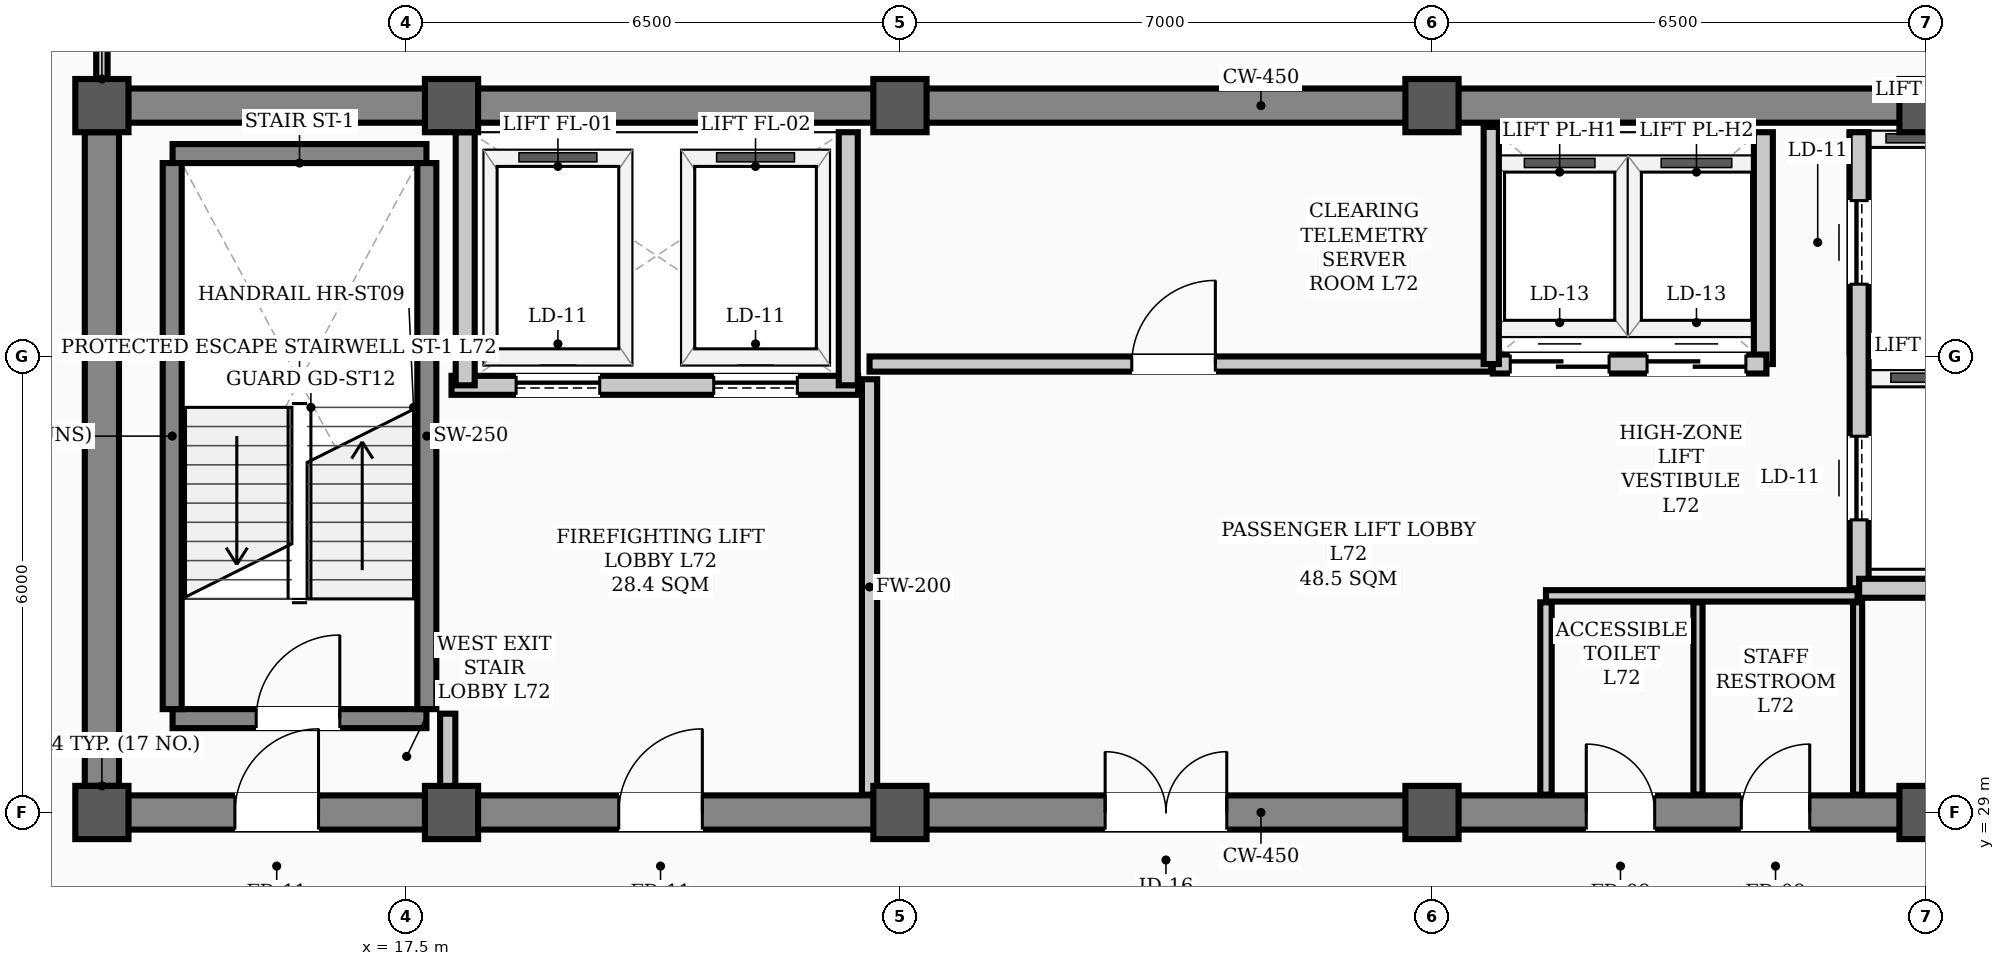
"""IFC4 building model, lengths in metres.
Left out: names, types, materials, properties, quantities, classifications, styles, units other than length and angle.
Written with IfcOpenShell. Run it as: python <this file> out.ifc"""

import sys

from ifc_helpers import new_model, si_unit, direction, frame, frame_2d, origin, origin_2d, place, context, subcontext, project, spatial, rectangle, hollow_rectangle, extrude, element, fill, save


model = new_model("IFC4")
c1 = context("Model", 3, precision=1e-05, world=origin(), true_north=direction((0.0, 1.0)))
c2 = subcontext(c1, "Body", "Model", "MODEL_VIEW")
j1 = project(units=[si_unit("LENGTHUNIT", "METRE"), si_unit("PLANEANGLEUNIT", "RADIAN")], contexts=[c1])
p1 = place(None, origin())
s1 = spatial("IfcSite", under=j1, at=p1, CompositionType="ELEMENT")
p2 = place(p1, origin())
s2 = spatial("IfcBuilding", under=s1, at=p2, CompositionType="ELEMENT")
p3 = place(p2, frame((0.0, 0.0, 289.1)))
s3 = spatial("IfcBuildingStorey", under=s2, at=p3, CompositionType="ELEMENT", Elevation=289.1)
for number, where, z_axis, x_axis in (
    (1, (13.5, 29.0, 0.0), (0.0, 0.0, 1.0), (1.0, 0.0, 0.0)),
    (2, (13.5, 38.3, 0.0), (0.0, 0.0, 1.0), (1.0, 0.0, 0.0)),
    (3, (18.1, 29.0, 0.0), (0.0, 0.0, 1.0), (1.0, 0.0, 0.0)),
    (4, (18.1, 38.3, 0.0), (0.0, 0.0, 1.0), (1.0, 0.0, 0.0)),
    (5, (24.0, 29.0, 0.0), (0.0, 0.0, 1.0), (1.0, 0.0, 0.0)),
    (6, (24.0, 38.3, 0.0), (0.0, 0.0, 1.0), (1.0, 0.0, 0.0)),
    (7, (31.0, 29.0, 0.0), (0.0, 0.0, 1.0), (1.0, 0.0, 0.0)),
    (8, (31.0, 38.3, 0.0), (0.0, 0.0, 1.0), (1.0, 0.0, 0.0)),
    (9, (37.5, 29.0, 0.0), (0.0, 0.0, 1.0), (1.0, 0.0, 0.0)),
    (10, (37.5, 38.3, 0.0), (0.0, 0.0, 1.0), (1.0, 0.0, 0.0)),
):
    element("IfcColumn", number, at=place(p3, frame(where, z_axis=z_axis, x_axis=x_axis)), inside=s3, PredefinedType="COLUMN", context=c2, shape_type="SweptSolid", body=[
        extrude(hollow_rectangle(XDim=0.7, YDim=0.7, WallThickness=0.028, InnerFilletRadius=0.014, OuterFilletRadius=0.042, at=origin_2d()), origin(), (0.0, 0.0, 1.0), 3.9),
    ])
p4 = place(p3, frame((13.5, 29.0, 0.0), z_axis=(0.0, 0.0, 1.0), x_axis=(1.0, 0.0, 0.0)))
e11 = element("IfcWall", 11, at=p4, inside=s3, PredefinedType="SHEAR", context=c2, shape_type="SweptSolid", body=[
    extrude(rectangle(XDim=30.5, YDim=0.45, at=frame_2d((15.25, 0.0))), origin(), (0.0, 0.0, 1.0), 3.72),
])
p5 = place(p4, frame((1.75, 0.0, 0.0)))
e12 = element("IfcOpeningElement", 12, at=p5, cuts=e11, PredefinedType="OPENING", context=c2, shape_type="SweptSolid", body=[
    extrude(rectangle(XDim=1.1, YDim=2.08, at=frame_2d((0.55, 1.04))), frame((0.0, 0.235, 0.0), z_axis=(0.0, -1.0, 0.0), x_axis=(1.0, 0.0, 0.0)), (0.0, 0.0, 1.0), 0.47),
])
p6 = place(p4, frame((26.7, 0.0, 0.0)))
e13 = element("IfcOpeningElement", 13, at=p6, cuts=e11, PredefinedType="OPENING", context=c2, shape_type="SweptSolid", body=[
    extrude(rectangle(XDim=1.1, YDim=2.08, at=frame_2d((0.55, 1.04))), frame((0.0, 0.235, 0.0), z_axis=(0.0, -1.0, 0.0), x_axis=(1.0, 0.0, 0.0)), (0.0, 0.0, 1.0), 0.47),
])
p7 = place(p4, frame((6.8, 0.0, 0.0)))
e14 = element("IfcOpeningElement", 14, at=p7, cuts=e11, PredefinedType="OPENING", context=c2, shape_type="SweptSolid", body=[
    extrude(rectangle(XDim=1.1, YDim=2.08, at=frame_2d((0.55, 1.04))), frame((0.0, 0.235, 0.0), z_axis=(0.0, -1.0, 0.0), x_axis=(1.0, 0.0, 0.0)), (0.0, 0.0, 1.0), 0.47),
])
p8 = place(p4, frame((13.2, 0.0, 0.0)))
e15 = element("IfcOpeningElement", 15, at=p8, cuts=e11, PredefinedType="OPENING", context=c2, shape_type="SweptSolid", body=[
    extrude(rectangle(XDim=1.6, YDim=2.08, at=frame_2d((0.8, 1.04))), frame((0.0, 0.235, 0.0), z_axis=(0.0, -1.0, 0.0), x_axis=(1.0, 0.0, 0.0)), (0.0, 0.0, 1.0), 0.47),
])
p9 = place(p4, frame((19.53, 0.0, 0.0)))
e16 = element("IfcOpeningElement", 16, at=p9, cuts=e11, PredefinedType="OPENING", context=c2, shape_type="SweptSolid", body=[
    extrude(rectangle(XDim=0.9, YDim=2.08, at=frame_2d((0.45, 1.04))), frame((0.0, 0.235, 0.0), z_axis=(0.0, -1.0, 0.0), x_axis=(1.0, 0.0, 0.0)), (0.0, 0.0, 1.0), 0.47),
])
p10 = place(p4, frame((21.57, 0.0, 0.0)))
e17 = element("IfcOpeningElement", 17, at=p10, cuts=e11, PredefinedType="OPENING", context=c2, shape_type="SweptSolid", body=[
    extrude(rectangle(XDim=0.9, YDim=2.08, at=frame_2d((0.45, 1.04))), frame((0.0, 0.235, 0.0), z_axis=(0.0, -1.0, 0.0), x_axis=(1.0, 0.0, 0.0)), (0.0, 0.0, 1.0), 0.47),
])
p11 = place(p3, frame((13.5, 38.3, 0.0), z_axis=(0.0, 0.0, 1.0), x_axis=(1.0, 0.0, 0.0)))
e18 = element("IfcWall", 18, at=p11, inside=s3, PredefinedType="SHEAR", context=c2, shape_type="SweptSolid", body=[
    extrude(rectangle(XDim=30.5, YDim=0.45, at=frame_2d((15.25, 0.0))), origin(), (0.0, 0.0, 1.0), 3.72),
])
p12 = place(p3, frame((13.5, 29.35, 0.0), z_axis=(0.0, 0.0, 1.0), x_axis=(0.0, 1.0, 0.0)))
e19 = element("IfcWall", 19, at=p12, inside=s3, PredefinedType="SHEAR", context=c2, shape_type="SweptSolid", body=[
    extrude(rectangle(XDim=8.6, YDim=0.45, at=frame_2d((4.3, 0.0))), origin(), (0.0, 0.0, 1.0), 3.72),
])
p13 = place(p3, frame((14.43, 30.235, 0.0), z_axis=(0.0, 0.0, 1.0), x_axis=(1.0, 0.0, 0.0)))
e20 = element("IfcWall", 20, at=p13, inside=s3, PredefinedType="STANDARD", context=c2, shape_type="SweptSolid", body=[
    extrude(rectangle(XDim=3.34, YDim=0.25, at=frame_2d((1.67, 0.0))), origin(), (0.0, 0.0, 1.0), 3.72),
])
p14 = place(p13, frame((1.1, 0.0, 0.0)))
e21 = element("IfcOpeningElement", 21, at=p14, cuts=e20, PredefinedType="OPENING", context=c2, shape_type="SweptSolid", body=[
    extrude(rectangle(XDim=1.1, YDim=2.08, at=frame_2d((0.55, 1.04))), frame((0.0, 0.135, 0.0), z_axis=(0.0, -1.0, 0.0), x_axis=(1.0, 0.0, 0.0)), (0.0, 0.0, 1.0), 0.27),
])
p15 = place(p3, frame((14.43, 37.669, 0.0), z_axis=(0.0, 0.0, 1.0), x_axis=(1.0, 0.0, 0.0)))
e22 = element("IfcWall", 22, at=p15, inside=s3, PredefinedType="STANDARD", context=c2, shape_type="SweptSolid", body=[
    extrude(rectangle(XDim=3.34, YDim=0.25, at=frame_2d((1.67, 0.0))), origin(), (0.0, 0.0, 1.0), 3.72),
])
for number, where, z_axis, x_axis in (
    (23, (14.425, 30.36, 0.0), (0.0, 0.0, 1.0), (0.0, 1.0, 0.0)),
    (24, (17.775, 30.36, 0.0), (0.0, 0.0, 1.0), (0.0, 1.0, 0.0)),
):
    element("IfcWall", number, at=place(p3, frame(where, z_axis=z_axis, x_axis=x_axis)), inside=s3, PredefinedType="STANDARD", context=c2, shape_type="SweptSolid", body=[
        extrude(rectangle(XDim=7.184, YDim=0.25, at=frame_2d((3.592, 0.0))), origin(), (0.0, 0.0, 1.0), 3.72),
    ])
p16 = place(p3, frame((18.1, 34.62, 0.0), z_axis=(0.0, 0.0, 1.0), x_axis=(1.0, 0.0, 0.0)))
e25 = element("IfcWall", 25, at=p16, inside=s3, PredefinedType="STANDARD", context=c2, shape_type="SweptSolid", body=[
    extrude(rectangle(XDim=5.35, YDim=0.25, at=frame_2d((2.675, 0.0))), origin(), (0.0, 0.0, 1.0), 3.72),
])
p17 = place(p16, frame((0.85, 0.0, 0.0)))
e26 = element("IfcOpeningElement", 26, at=p17, cuts=e25, PredefinedType="OPENING", context=c2, shape_type="SweptSolid", body=[
    extrude(rectangle(XDim=1.1, YDim=2.08, at=frame_2d((0.55, 1.04))), frame((0.0, 0.135, 0.0), z_axis=(0.0, -1.0, 0.0), x_axis=(1.0, 0.0, 0.0)), (0.0, 0.0, 1.0), 0.27),
])
p18 = place(p16, frame((3.45, 0.0, 0.0)))
e27 = element("IfcOpeningElement", 27, at=p18, cuts=e25, PredefinedType="OPENING", context=c2, shape_type="SweptSolid", body=[
    extrude(rectangle(XDim=1.1, YDim=2.08, at=frame_2d((0.55, 1.04))), frame((0.0, 0.135, 0.0), z_axis=(0.0, -1.0, 0.0), x_axis=(1.0, 0.0, 0.0)), (0.0, 0.0, 1.0), 0.27),
])
p19 = place(p3, frame((36.62, 31.95, 0.0), z_axis=(0.0, 0.0, 1.0), x_axis=(0.0, 1.0, 0.0)))
e28 = element("IfcWall", 28, at=p19, inside=s3, PredefinedType="STANDARD", context=c2, shape_type="SweptSolid", body=[
    extrude(rectangle(XDim=6.0, YDim=0.25, at=frame_2d((3.0, 0.0))), origin(), (0.0, 0.0, 1.0), 3.4),
])
p20 = place(p19, frame((0.9, 0.0, 0.0)))
e29 = element("IfcOpeningElement", 29, at=p20, cuts=e28, PredefinedType="OPENING", context=c2, shape_type="SweptSolid", body=[
    extrude(rectangle(XDim=1.1, YDim=2.08, at=frame_2d((0.55, 1.04))), frame((0.0, 0.135, 0.0), z_axis=(0.0, -1.0, 0.0), x_axis=(1.0, 0.0, 0.0)), (0.0, 0.0, 1.0), 0.27),
])
p21 = place(p19, frame((4.0, 0.0, 0.0)))
e30 = element("IfcOpeningElement", 30, at=p21, cuts=e28, PredefinedType="OPENING", context=c2, shape_type="SweptSolid", body=[
    extrude(rectangle(XDim=1.1, YDim=2.08, at=frame_2d((0.55, 1.04))), frame((0.0, 0.135, 0.0), z_axis=(0.0, -1.0, 0.0), x_axis=(1.0, 0.0, 0.0)), (0.0, 0.0, 1.0), 0.27),
])
p22 = place(p3, frame((36.62, 31.95, 0.0), z_axis=(0.0, 0.0, 1.0), x_axis=(1.0, 0.0, 0.0)))
e31 = element("IfcWall", 31, at=p22, inside=s3, PredefinedType="STANDARD", context=c2, shape_type="SweptSolid", body=[
    extrude(rectangle(XDim=1.9, YDim=0.25, at=frame_2d((0.95, 0.0))), origin(), (0.0, 0.0, 1.0), 3.48),
])
for number, where, z_axis, x_axis in (
    (32, (18.28, 34.62, 0.0), (0.0, 0.0, 1.0), (0.0, 1.0, 0.0)),
    (33, (23.32, 34.62, 0.0), (0.0, 0.0, 1.0), (0.0, 1.0, 0.0)),
):
    element("IfcWall", number, at=place(p3, frame(where, z_axis=z_axis, x_axis=x_axis)), inside=s3, PredefinedType="STANDARD", context=c2, shape_type="SweptSolid", body=[
        extrude(rectangle(XDim=3.33, YDim=0.25, at=frame_2d((1.665, 0.0))), origin(), (0.0, 0.0, 1.0), 3.72),
    ])
p23 = place(p3, frame((35.36, 34.9, 0.0), z_axis=(0.0, 0.0, 1.0), x_axis=(0.0, 1.0, 0.0)))
e34 = element("IfcWall", 34, at=p23, inside=s3, PredefinedType="STANDARD", context=c2, shape_type="SweptSolid", body=[
    extrude(rectangle(XDim=3.05, YDim=0.25, at=frame_2d((1.525, 0.0))), origin(), (0.0, 0.0, 1.0), 3.4),
])
p24 = place(p3, frame((31.8, 34.9, 0.0), z_axis=(0.0, 0.0, 1.0), x_axis=(1.0, 0.0, 0.0)))
e35 = element("IfcWall", 35, at=p24, inside=s3, PredefinedType="STANDARD", context=c2, shape_type="SweptSolid", body=[
    extrude(rectangle(XDim=3.6, YDim=0.25, at=frame_2d((1.8, 0.0))), origin(), (0.0, 0.0, 1.0), 3.72),
])
p25 = place(p24, frame((0.23, 0.0, 0.0)))
e36 = element("IfcOpeningElement", 36, at=p25, cuts=e35, PredefinedType="OPENING", context=c2, shape_type="SweptSolid", body=[
    extrude(rectangle(XDim=1.3, YDim=2.08, at=frame_2d((0.65, 1.04))), frame((0.0, 0.135, 0.0), z_axis=(0.0, -1.0, 0.0), x_axis=(1.0, 0.0, 0.0)), (0.0, 0.0, 1.0), 0.27),
])
p26 = place(p24, frame((2.03, 0.0, 0.0)))
e37 = element("IfcOpeningElement", 37, at=p26, cuts=e35, PredefinedType="OPENING", context=c2, shape_type="SweptSolid", body=[
    extrude(rectangle(XDim=1.3, YDim=2.08, at=frame_2d((0.65, 1.04))), frame((0.0, 0.135, 0.0), z_axis=(0.0, -1.0, 0.0), x_axis=(1.0, 0.0, 0.0)), (0.0, 0.0, 1.0), 0.27),
])
p27 = place(p3, frame((23.6, 34.9, 0.0), z_axis=(0.0, 0.0, 1.0), x_axis=(1.0, 0.0, 0.0)))
e38 = element("IfcWall", 38, at=p27, inside=s3, PredefinedType="STANDARD", context=c2, shape_type="SweptSolid", body=[
    extrude(rectangle(XDim=8.18, YDim=0.2, at=frame_2d((4.09, 0.0))), origin(), (0.0, 0.0, 1.0), 3.72),
])
p28 = place(p27, frame((3.45, 0.0, 0.0)))
e39 = element("IfcOpeningElement", 39, at=p28, cuts=e38, PredefinedType="OPENING", context=c2, shape_type="SweptSolid", body=[
    extrude(rectangle(XDim=1.1, YDim=2.08, at=frame_2d((0.55, 1.04))), frame((0.0, 0.11, 0.0), z_axis=(0.0, -1.0, 0.0), x_axis=(1.0, 0.0, 0.0)), (0.0, 0.0, 1.0), 0.22),
])
p29 = place(p3, frame((32.5, 31.85, 0.0), z_axis=(0.0, 0.0, 1.0), x_axis=(1.0, 0.0, 0.0)))
e40 = element("IfcWall", 40, at=p29, inside=s3, PredefinedType="PARTITIONING", context=c2, shape_type="SweptSolid", body=[
    extrude(rectangle(XDim=4.1, YDim=0.15, at=frame_2d((2.05, 0.0))), origin(), (0.0, 0.0, 1.0), 3.72),
])
p30 = place(p3, frame((18.05, 29.235, 0.0), z_axis=(0.0, 0.0, 1.0), x_axis=(0.0, 1.0, 0.0)))
e41 = element("IfcWall", 41, at=p30, inside=s3, PredefinedType="STANDARD", context=c2, shape_type="SweptSolid", body=[
    extrude(rectangle(XDim=1.065, YDim=0.2, at=frame_2d((0.532, 0.0))), origin(), (0.0, 0.0, 1.0), 3.72),
])
p31 = place(p3, frame((23.6, 29.235, 0.0), z_axis=(0.0, 0.0, 1.0), x_axis=(0.0, 1.0, 0.0)))
e42 = element("IfcWall", 42, at=p31, inside=s3, PredefinedType="STANDARD", context=c2, shape_type="SweptSolid", body=[
    extrude(rectangle(XDim=5.465, YDim=0.2, at=frame_2d((2.732, 0.0))), origin(), (0.0, 0.0, 1.0), 3.2),
])
p32 = place(p3, frame((32.5, 29.235, 0.0), z_axis=(0.0, 0.0, 1.0), x_axis=(0.0, 1.0, 0.0)))
e43 = element("IfcWall", 43, at=p32, inside=s3, PredefinedType="PARTITIONING", context=c2, shape_type="SweptSolid", body=[
    extrude(rectangle(XDim=2.53, YDim=0.15, at=frame_2d((1.265, 0.0))), origin(), (0.0, 0.0, 1.0), 3.4),
])
for number, where, z_axis, x_axis in (
    (44, (36.6, 29.235, 0.0), (0.0, 0.0, 1.0), (0.0, 1.0, 0.0)),
    (45, (34.5, 29.235, 0.0), (0.0, 0.0, 1.0), (0.0, 1.0, 0.0)),
):
    element("IfcWall", number, at=place(p3, frame(where, z_axis=z_axis, x_axis=x_axis)), inside=s3, PredefinedType="PARTITIONING", context=c2, shape_type="SweptSolid", body=[
        extrude(rectangle(XDim=2.53, YDim=0.12, at=frame_2d((1.265, 0.0))), origin(), (0.0, 0.0, 1.0), 3.4),
    ])
p33 = place(p3, frame((13.5, 38.535, 0.0), z_axis=(0.0, 0.0, 1.0), x_axis=(0.0, 1.0, 0.0)))
e46 = element("IfcWall", 46, at=p33, inside=s3, PredefinedType="PARTITIONING", context=c2, shape_type="SweptSolid", body=[
    extrude(rectangle(XDim=2.405, YDim=0.15, at=frame_2d((1.203, 0.0))), origin(), (0.0, 0.0, 1.0), 3.72),
])
p34 = place(p3, frame((31.78, 34.9, 0.0), z_axis=(0.0, 0.0, 1.0), x_axis=(0.0, 1.0, 0.0)))
e47 = element("IfcWall", 47, at=p34, inside=s3, PredefinedType="STANDARD", context=c2, shape_type="SweptSolid", body=[
    extrude(rectangle(XDim=3.12, YDim=0.2, at=frame_2d((1.56, 0.0))), origin(), (0.0, 0.0, 1.0), 3.4),
])
p35 = place(p14, origin())
e48 = element("IfcDoor", 48, at=p35, inside=s3, OperationType="SINGLE_SWING_RIGHT", PredefinedType="DOOR", context=c2, shape_type="SweptSolid", body=[
    extrude(rectangle(XDim=1.1, YDim=2.08, at=frame_2d((0.55, 1.04))), frame((0.0, 0.025, 0.0), z_axis=(0.0, -1.0, 0.0), x_axis=(1.0, 0.0, 0.0)), (0.0, 0.0, 1.0), 0.05),
])
fill(e21, e48)
p36 = place(p5, origin())
e49 = element("IfcDoor", 49, at=p36, inside=s3, OperationType="SINGLE_SWING_RIGHT", PredefinedType="DOOR", context=c2, shape_type="SweptSolid", body=[
    extrude(rectangle(XDim=1.1, YDim=2.08, at=frame_2d((0.55, 1.04))), frame((0.0, 0.025, 0.0), z_axis=(0.0, -1.0, 0.0), x_axis=(1.0, 0.0, 0.0)), (0.0, 0.0, 1.0), 0.05),
])
fill(e12, e49)
p37 = place(p7, origin())
e50 = element("IfcDoor", 50, at=p37, inside=s3, OperationType="SINGLE_SWING_RIGHT", PredefinedType="DOOR", context=c2, shape_type="SweptSolid", body=[
    extrude(rectangle(XDim=1.1, YDim=2.08, at=frame_2d((0.55, 1.04))), frame((0.0, 0.025, 0.0), z_axis=(0.0, -1.0, 0.0), x_axis=(1.0, 0.0, 0.0)), (0.0, 0.0, 1.0), 0.05),
])
fill(e14, e50)
p38 = place(p8, origin())
e51 = element("IfcDoor", 51, at=p38, inside=s3, OperationType="DOUBLE_DOOR_SINGLE_SWING", PredefinedType="DOOR", context=c2, shape_type="SweptSolid", body=[
    extrude(rectangle(XDim=1.6, YDim=2.08, at=frame_2d((0.8, 1.04))), frame((0.0, 0.025, 0.0), z_axis=(0.0, -1.0, 0.0), x_axis=(1.0, 0.0, 0.0)), (0.0, 0.0, 1.0), 0.05),
])
fill(e15, e51)
p39 = place(p28, origin())
e52 = element("IfcDoor", 52, at=p39, inside=s3, OperationType="SINGLE_SWING_RIGHT", PredefinedType="DOOR", context=c2, shape_type="SweptSolid", body=[
    extrude(rectangle(XDim=1.1, YDim=2.08, at=frame_2d((0.55, 1.04))), frame((0.0, 0.025, 0.0), z_axis=(0.0, -1.0, 0.0), x_axis=(1.0, 0.0, 0.0)), (0.0, 0.0, 1.0), 0.05),
])
fill(e39, e52)
p40 = place(p9, origin())
e53 = element("IfcDoor", 53, at=p40, inside=s3, OperationType="SINGLE_SWING_LEFT", PredefinedType="DOOR", context=c2, shape_type="SweptSolid", body=[
    extrude(rectangle(XDim=0.9, YDim=2.08, at=frame_2d((0.45, 1.04))), frame((0.0, 0.025, 0.0), z_axis=(0.0, -1.0, 0.0), x_axis=(1.0, 0.0, 0.0)), (0.0, 0.0, 1.0), 0.05),
])
fill(e16, e53)
p41 = place(p10, origin())
e54 = element("IfcDoor", 54, at=p41, inside=s3, OperationType="SINGLE_SWING_RIGHT", PredefinedType="DOOR", context=c2, shape_type="SweptSolid", body=[
    extrude(rectangle(XDim=0.9, YDim=2.08, at=frame_2d((0.45, 1.04))), frame((0.0, 0.025, 0.0), z_axis=(0.0, -1.0, 0.0), x_axis=(1.0, 0.0, 0.0)), (0.0, 0.0, 1.0), 0.05),
])
fill(e17, e54)
p42 = place(p17, origin())
e55 = element("IfcDoor", 55, at=p42, inside=s3, OperationType="SLIDING_TO_LEFT", PredefinedType="DOOR", context=c2, shape_type="SweptSolid", body=[
    extrude(rectangle(XDim=1.1, YDim=2.08, at=frame_2d((0.55, 1.04))), frame((0.0, 0.025, 0.0), z_axis=(0.0, -1.0, 0.0), x_axis=(1.0, 0.0, 0.0)), (0.0, 0.0, 1.0), 0.05),
])
fill(e26, e55)
p43 = place(p18, origin())
e56 = element("IfcDoor", 56, at=p43, inside=s3, OperationType="SLIDING_TO_LEFT", PredefinedType="DOOR", context=c2, shape_type="SweptSolid", body=[
    extrude(rectangle(XDim=1.1, YDim=2.08, at=frame_2d((0.55, 1.04))), frame((0.0, 0.025, 0.0), z_axis=(0.0, -1.0, 0.0), x_axis=(1.0, 0.0, 0.0)), (0.0, 0.0, 1.0), 0.05),
])
fill(e27, e56)
p44 = place(p20, origin())
e57 = element("IfcDoor", 57, at=p44, inside=s3, OperationType="SLIDING_TO_LEFT", PredefinedType="DOOR", context=c2, shape_type="SweptSolid", body=[
    extrude(rectangle(XDim=1.1, YDim=2.08, at=frame_2d((0.55, 1.04))), frame((0.0, 0.025, 0.0), z_axis=(0.0, -1.0, 0.0), x_axis=(1.0, 0.0, 0.0)), (0.0, 0.0, 1.0), 0.05),
])
fill(e29, e57)
p45 = place(p21, origin())
e58 = element("IfcDoor", 58, at=p45, inside=s3, OperationType="SLIDING_TO_LEFT", PredefinedType="DOOR", context=c2, shape_type="SweptSolid", body=[
    extrude(rectangle(XDim=1.1, YDim=2.08, at=frame_2d((0.55, 1.04))), frame((0.0, 0.025, 0.0), z_axis=(0.0, -1.0, 0.0), x_axis=(1.0, 0.0, 0.0)), (0.0, 0.0, 1.0), 0.05),
])
fill(e30, e58)
p46 = place(p25, origin())
e59 = element("IfcDoor", 59, at=p46, inside=s3, OperationType="DOUBLE_DOOR_SLIDING", PredefinedType="DOOR", context=c2, shape_type="SweptSolid", body=[
    extrude(rectangle(XDim=1.3, YDim=2.08, at=frame_2d((0.65, 1.04))), frame((0.0, 0.025, 0.0), z_axis=(0.0, -1.0, 0.0), x_axis=(1.0, 0.0, 0.0)), (0.0, 0.0, 1.0), 0.05),
])
fill(e36, e59)
p47 = place(p26, origin())
e60 = element("IfcDoor", 60, at=p47, inside=s3, OperationType="DOUBLE_DOOR_SLIDING", PredefinedType="DOOR", context=c2, shape_type="SweptSolid", body=[
    extrude(rectangle(XDim=1.3, YDim=2.08, at=frame_2d((0.65, 1.04))), frame((0.0, 0.025, 0.0), z_axis=(0.0, -1.0, 0.0), x_axis=(1.0, 0.0, 0.0)), (0.0, 0.0, 1.0), 0.05),
])
fill(e37, e60)
save(model, sys.argv[1])
